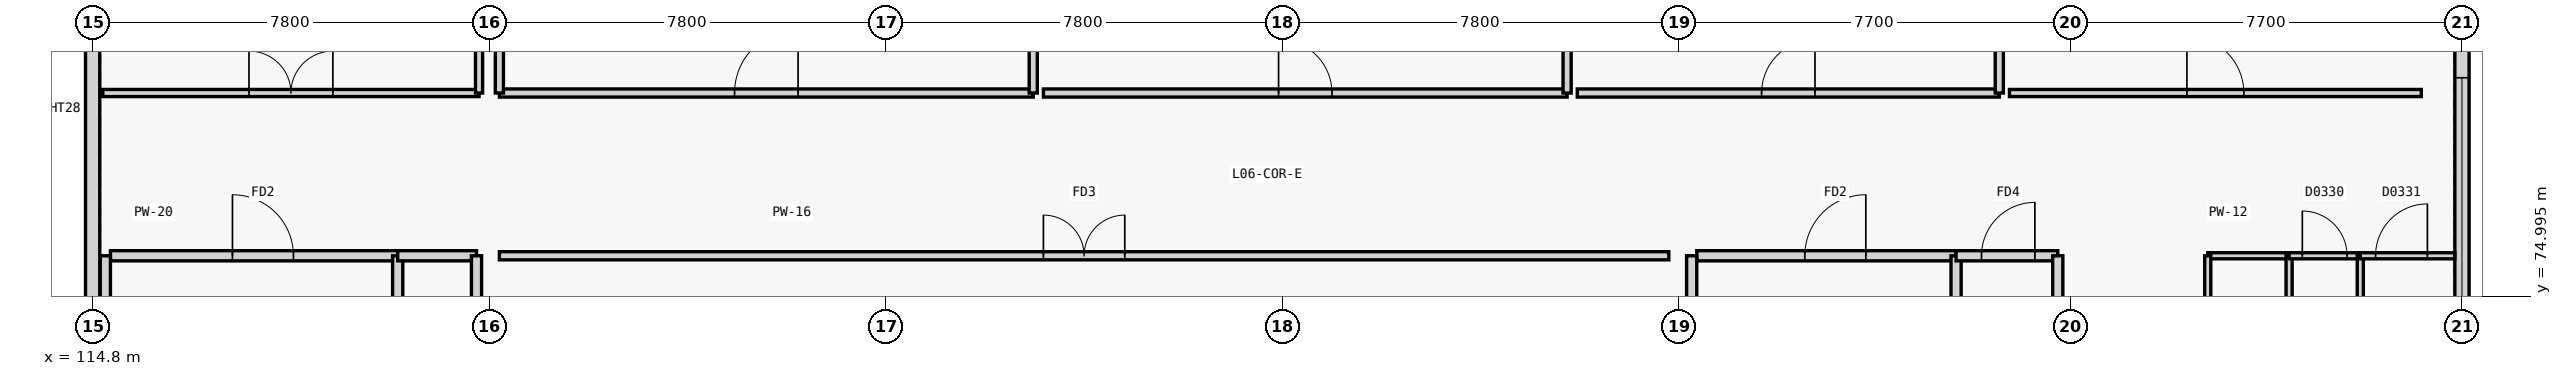
"""IFC4 building model, lengths in metres.
Left out: names, types, materials, properties, quantities, classifications, styles, units other than length and angle.
Written with IfcOpenShell. Run it as: python <this file> out.ifc"""

import sys

from ifc_helpers import new_model, si_unit, direction, frame, frame_2d, origin, place, context, subcontext, project, spatial, rectangle, extrude, element, fill, save


model = new_model("IFC4")
c1 = context("Model", 3, precision=1e-05, world=origin(), true_north=direction((0.0, 1.0)))
c2 = subcontext(c1, "Body", "Model", "MODEL_VIEW")
j1 = project(units=[si_unit("LENGTHUNIT", "METRE"), si_unit("PLANEANGLEUNIT", "RADIAN")], contexts=[c1])
p1 = place(None, origin())
s1 = spatial("IfcSite", under=j1, at=p1, CompositionType="ELEMENT")
p2 = place(p1, origin())
s2 = spatial("IfcBuilding", under=s1, at=p2, CompositionType="ELEMENT")
p3 = place(p2, frame((0.0, 0.0, 25.2)))
s3 = spatial("IfcBuildingStorey", under=s2, at=p3, CompositionType="ELEMENT", Elevation=25.2)
p4 = place(p3, frame((161.4, 96.777, 0.0), z_axis=(0.0, 0.0, 1.0), x_axis=(0.0, -1.0, 0.0)))
e1 = element("IfcWall", 1, at=p4, inside=s3, PredefinedType="SOLIDWALL", context=c2, shape_type="SweptSolid", body=[
    extrude(rectangle(XDim=32.554, YDim=0.28, at=frame_2d((16.277, 0.0))), origin(), (0.0, 0.0, 1.0), 2.78),
])
p5 = place(p4, frame((17.477, 0.0, 0.82)))
e2 = element("IfcOpeningElement", 2, at=p5, cuts=e1, PredefinedType="OPENING", context=c2, shape_type="SweptSolid", body=[
    extrude(rectangle(XDim=5.0, YDim=1.5, at=frame_2d((2.5, 0.75))), frame((0.0, 0.15, 0.0), z_axis=(0.0, -1.0, 0.0), x_axis=(1.0, 0.0, 0.0)), (0.0, 0.0, 1.0), 0.3),
])
p6 = place(p3, frame((114.8, 72.6, 0.0), z_axis=(0.0, 0.0, 1.0), x_axis=(0.0, 1.0, 0.0)))
e3 = element("IfcWall", 3, at=p6, inside=s3, PredefinedType="SOLIDWALL", context=c2, shape_type="SweptSolid", body=[
    extrude(rectangle(XDim=12.2, YDim=0.28, at=frame_2d((6.1, 0.0))), origin(), (0.0, 0.0, 1.0), 2.78),
])
p7 = place(p3, frame((115.15, 75.8, 0.0), z_axis=(0.0, 0.0, 1.0), x_axis=(1.0, 0.0, 0.0)))
e4 = element("IfcWall", 4, at=p7, inside=s3, PredefinedType="PARTITIONING", context=c2, shape_type="SweptSolid", body=[
    extrude(rectangle(XDim=5.65, YDim=0.2, at=frame_2d((2.825, 0.0))), origin(), (0.0, 0.0, 1.0), 3.32),
])
p8 = place(p7, frame((2.4, 0.0, 0.0)))
e5 = element("IfcOpeningElement", 5, at=p8, cuts=e4, PredefinedType="OPENING", context=c2, shape_type="SweptSolid", body=[
    extrude(rectangle(XDim=1.2, YDim=2.2, at=frame_2d((0.6, 1.1))), frame((0.0, 0.11, 0.0), z_axis=(0.0, -1.0, 0.0), x_axis=(1.0, 0.0, 0.0)), (0.0, 0.0, 1.0), 0.22),
])
p9 = place(p3, frame((115.05, 72.4, 0.0), z_axis=(0.0, 0.0, 1.0), x_axis=(0.0, 1.0, 0.0)))
e6 = element("IfcWall", 6, at=p9, inside=s3, PredefinedType="PARTITIONING", context=c2, shape_type="SweptSolid", body=[
    extrude(rectangle(XDim=3.4, YDim=0.2, at=frame_2d((1.7, 0.0))), origin(), (0.0, 0.0, 1.0), 2.78),
])
p10 = place(p3, frame((120.8, 72.4, 0.0), z_axis=(0.0, 0.0, 1.0), x_axis=(0.0, 1.0, 0.0)))
e7 = element("IfcWall", 7, at=p10, inside=s3, PredefinedType="PARTITIONING", context=c2, shape_type="SweptSolid", body=[
    extrude(rectangle(XDim=3.4, YDim=0.2, at=frame_2d((1.7, 0.0))), origin(), (0.0, 0.0, 1.0), 3.32),
])
p11 = place(p10, frame((1.1, 0.0, 0.0)))
e8 = element("IfcOpeningElement", 8, at=p11, cuts=e7, PredefinedType="OPENING", context=c2, shape_type="SweptSolid", body=[
    extrude(rectangle(XDim=1.2, YDim=2.2, at=frame_2d((0.6, 1.1))), frame((0.0, 0.11, 0.0), z_axis=(0.0, -1.0, 0.0), x_axis=(1.0, 0.0, 0.0)), (0.0, 0.0, 1.0), 0.22),
])
p12 = place(p3, frame((120.8, 75.8, 0.0), z_axis=(0.0, 0.0, 1.0), x_axis=(1.0, 0.0, 0.0)))
e9 = element("IfcWall", 9, at=p12, inside=s3, PredefinedType="PARTITIONING", context=c2, shape_type="SweptSolid", body=[
    extrude(rectangle(XDim=1.55, YDim=0.2, at=frame_2d((0.775, 0.0))), origin(), (0.0, 0.0, 1.0), 3.32),
])
p13 = place(p3, frame((122.35, 72.4, 0.0), z_axis=(0.0, 0.0, 1.0), x_axis=(0.0, 1.0, 0.0)))
e10 = element("IfcWall", 10, at=p13, inside=s3, PredefinedType="PARTITIONING", context=c2, shape_type="SweptSolid", body=[
    extrude(rectangle(XDim=3.4, YDim=0.2, at=frame_2d((1.7, 0.0))), origin(), (0.0, 0.0, 1.0), 2.82),
])
p14 = place(p3, frame((146.35, 75.8, 0.0), z_axis=(0.0, 0.0, 1.0), x_axis=(1.0, 0.0, 0.0)))
e11 = element("IfcWall", 11, at=p14, inside=s3, PredefinedType="PARTITIONING", context=c2, shape_type="SweptSolid", body=[
    extrude(rectangle(XDim=5.1, YDim=0.2, at=frame_2d((2.55, 0.0))), origin(), (0.0, 0.0, 1.0), 3.32),
])
p15 = place(p14, frame((2.125, 0.0, 0.0)))
e12 = element("IfcOpeningElement", 12, at=p15, cuts=e11, PredefinedType="OPENING", context=c2, shape_type="SweptSolid", body=[
    extrude(rectangle(XDim=1.2, YDim=2.2, at=frame_2d((0.6, 1.1))), frame((0.0, 0.11, 0.0), z_axis=(0.0, -1.0, 0.0), x_axis=(1.0, 0.0, 0.0)), (0.0, 0.0, 1.0), 0.22),
])
p16 = place(p3, frame((146.25, 72.4, 0.0), z_axis=(0.0, 0.0, 1.0), x_axis=(0.0, 1.0, 0.0)))
e13 = element("IfcWall", 13, at=p16, inside=s3, PredefinedType="PARTITIONING", context=c2, shape_type="SweptSolid", body=[
    extrude(rectangle(XDim=3.4, YDim=0.2, at=frame_2d((1.7, 0.0))), origin(), (0.0, 0.0, 1.0), 2.82),
])
p17 = place(p3, frame((151.45, 72.4, 0.0), z_axis=(0.0, 0.0, 1.0), x_axis=(0.0, 1.0, 0.0)))
e14 = element("IfcWall", 14, at=p17, inside=s3, PredefinedType="PARTITIONING", context=c2, shape_type="SweptSolid", body=[
    extrude(rectangle(XDim=3.4, YDim=0.2, at=frame_2d((1.7, 0.0))), origin(), (0.0, 0.0, 1.0), 3.32),
])
p18 = place(p17, frame((1.1, 0.0, 0.0)))
e15 = element("IfcOpeningElement", 15, at=p18, cuts=e14, PredefinedType="OPENING", context=c2, shape_type="SweptSolid", body=[
    extrude(rectangle(XDim=1.2, YDim=2.2, at=frame_2d((0.6, 1.1))), frame((0.0, 0.11, 0.0), z_axis=(0.0, -1.0, 0.0), x_axis=(1.0, 0.0, 0.0)), (0.0, 0.0, 1.0), 0.22),
])
p19 = place(p3, frame((151.45, 75.8, 0.0), z_axis=(0.0, 0.0, 1.0), x_axis=(1.0, 0.0, 0.0)))
e16 = element("IfcWall", 16, at=p19, inside=s3, PredefinedType="PARTITIONING", context=c2, shape_type="SweptSolid", body=[
    extrude(rectangle(XDim=2.0, YDim=0.2, at=frame_2d((1.0, 0.0))), origin(), (0.0, 0.0, 1.0), 3.32),
])
p20 = place(p19, frame((0.5, 0.0, 0.0)))
e17 = element("IfcOpeningElement", 17, at=p20, cuts=e16, PredefinedType="OPENING", context=c2, shape_type="SweptSolid", body=[
    extrude(rectangle(XDim=1.05, YDim=2.15, at=frame_2d((0.525, 1.075))), frame((0.0, 0.11, 0.0), z_axis=(0.0, -1.0, 0.0), x_axis=(1.0, 0.0, 0.0)), (0.0, 0.0, 1.0), 0.22),
])
p21 = place(p3, frame((153.45, 72.4, 0.0), z_axis=(0.0, 0.0, 1.0), x_axis=(0.0, 1.0, 0.0)))
e18 = element("IfcWall", 18, at=p21, inside=s3, PredefinedType="PARTITIONING", context=c2, shape_type="SweptSolid", body=[
    extrude(rectangle(XDim=3.4, YDim=0.2, at=frame_2d((1.7, 0.0))), origin(), (0.0, 0.0, 1.0), 2.82),
])
p22 = place(p3, frame((115.0, 79.0, 0.0), z_axis=(0.0, 0.0, 1.0), x_axis=(1.0, 0.0, 0.0)))
e19 = element("IfcWall", 19, at=p22, inside=s3, PredefinedType="PARTITIONING", context=c2, shape_type="SweptSolid", body=[
    extrude(rectangle(XDim=7.4, YDim=0.14, at=frame_2d((3.7, 0.0))), origin(), (0.0, 0.0, 1.0), 3.34),
])
p23 = place(p22, frame((2.875, 0.0, 0.0)))
e20 = element("IfcOpeningElement", 20, at=p23, cuts=e19, PredefinedType="OPENING", context=c2, shape_type="SweptSolid", body=[
    extrude(rectangle(XDim=1.65, YDim=2.3, at=frame_2d((0.825, 1.15))), frame((0.0, 0.08, 0.0), z_axis=(0.0, -1.0, 0.0), x_axis=(1.0, 0.0, 0.0)), (0.0, 0.0, 1.0), 0.16),
])
p24 = place(p3, frame((122.4, 79.0, 0.0), z_axis=(0.0, 0.0, 1.0), x_axis=(0.0, 1.0, 0.0)))
e21 = element("IfcWall", 21, at=p24, inside=s3, PredefinedType="PARTITIONING", context=c2, shape_type="SweptSolid", body=[
    extrude(rectangle(XDim=5.4, YDim=0.14, at=frame_2d((2.7, 0.0))), origin(), (0.0, 0.0, 1.0), 2.82),
])
p25 = place(p3, frame((122.8, 75.8, 0.0), z_axis=(0.0, 0.0, 1.0), x_axis=(1.0, 0.0, 0.0)))
e22 = element("IfcWall", 22, at=p25, inside=s3, PredefinedType="PARTITIONING", context=c2, shape_type="SweptSolid", body=[
    extrude(rectangle(XDim=23.0, YDim=0.16, at=frame_2d((11.5, 0.0))), origin(), (0.0, 0.0, 1.0), 3.34),
])
p26 = place(p25, frame((10.7, 0.0, 0.0)))
e23 = element("IfcOpeningElement", 23, at=p26, cuts=e22, PredefinedType="OPENING", context=c2, shape_type="SweptSolid", body=[
    extrude(rectangle(XDim=1.6, YDim=2.2, at=frame_2d((0.8, 1.1))), frame((0.0, 0.09, 0.0), z_axis=(0.0, -1.0, 0.0), x_axis=(1.0, 0.0, 0.0)), (0.0, 0.0, 1.0), 0.18),
])
p27 = place(p3, frame((156.4, 75.8, 0.0), z_axis=(0.0, 0.0, 1.0), x_axis=(1.0, 0.0, 0.0)))
e24 = element("IfcWall", 24, at=p27, inside=s3, PredefinedType="PARTITIONING", context=c2, shape_type="SweptSolid", body=[
    extrude(rectangle(XDim=1.6, YDim=0.12, at=frame_2d((0.8, 0.0))), origin(), (0.0, 0.0, 1.0), 3.34),
])
p28 = place(p3, frame((156.4, 70.6, 0.0), z_axis=(0.0, 0.0, 1.0), x_axis=(0.0, 1.0, 0.0)))
e25 = element("IfcWall", 25, at=p28, inside=s3, PredefinedType="PARTITIONING", context=c2, shape_type="SweptSolid", body=[
    extrude(rectangle(XDim=5.2, YDim=0.12, at=frame_2d((2.6, 0.0))), origin(), (0.0, 0.0, 1.0), 3.34),
])
p29 = place(p28, frame((2.16, 0.0, 0.0)))
e26 = element("IfcOpeningElement", 26, at=p29, cuts=e25, PredefinedType="OPENING", context=c2, shape_type="SweptSolid", body=[
    extrude(rectangle(XDim=0.88, YDim=2.1, at=frame_2d((0.44, 1.05))), frame((0.0, 0.07, 0.0), z_axis=(0.0, -1.0, 0.0), x_axis=(1.0, 0.0, 0.0)), (0.0, 0.0, 1.0), 0.14),
])
p30 = place(p3, frame((158.0, 70.6, 0.0), z_axis=(0.0, 0.0, 1.0), x_axis=(0.0, 1.0, 0.0)))
e27 = element("IfcWall", 27, at=p30, inside=s3, PredefinedType="PARTITIONING", context=c2, shape_type="SweptSolid", body=[
    extrude(rectangle(XDim=5.2, YDim=0.12, at=frame_2d((2.6, 0.0))), origin(), (0.0, 0.0, 1.0), 3.34),
])
p31 = place(p3, frame((158.0, 75.8, 0.0), z_axis=(0.0, 0.0, 1.0), x_axis=(1.0, 0.0, 0.0)))
e28 = element("IfcWall", 28, at=p31, inside=s3, PredefinedType="PARTITIONING", context=c2, shape_type="SweptSolid", body=[
    extrude(rectangle(XDim=1.4, YDim=0.12, at=frame_2d((0.7, 0.0))), origin(), (0.0, 0.0, 1.0), 3.34),
])
p32 = place(p31, frame((0.26, 0.0, 0.0)))
e29 = element("IfcOpeningElement", 29, at=p32, cuts=e28, PredefinedType="OPENING", context=c2, shape_type="SweptSolid", body=[
    extrude(rectangle(XDim=0.88, YDim=2.1, at=frame_2d((0.44, 1.05))), frame((0.0, 0.07, 0.0), z_axis=(0.0, -1.0, 0.0), x_axis=(1.0, 0.0, 0.0)), (0.0, 0.0, 1.0), 0.14),
])
p33 = place(p3, frame((159.4, 70.6, 0.0), z_axis=(0.0, 0.0, 1.0), x_axis=(0.0, 1.0, 0.0)))
e30 = element("IfcWall", 30, at=p33, inside=s3, PredefinedType="PARTITIONING", context=c2, shape_type="SweptSolid", body=[
    extrude(rectangle(XDim=5.2, YDim=0.12, at=frame_2d((2.6, 0.0))), origin(), (0.0, 0.0, 1.0), 3.34),
])
p34 = place(p3, frame((159.4, 75.8, 0.0), z_axis=(0.0, 0.0, 1.0), x_axis=(1.0, 0.0, 0.0)))
e31 = element("IfcWall", 31, at=p34, inside=s3, PredefinedType="PARTITIONING", context=c2, shape_type="SweptSolid", body=[
    extrude(rectangle(XDim=1.86, YDim=0.12, at=frame_2d((0.93, 0.0))), origin(), (0.0, 0.0, 1.0), 3.34),
])
p35 = place(p34, frame((0.3, 0.0, 0.0)))
e32 = element("IfcOpeningElement", 32, at=p35, cuts=e31, PredefinedType="OPENING", context=c2, shape_type="SweptSolid", body=[
    extrude(rectangle(XDim=1.02, YDim=2.1, at=frame_2d((0.51, 1.05))), frame((0.0, 0.07, 0.0), z_axis=(0.0, -1.0, 0.0), x_axis=(1.0, 0.0, 0.0)), (0.0, 0.0, 1.0), 0.14),
])
p36 = place(p3, frame((122.8, 79.0, 0.0), z_axis=(0.0, 0.0, 1.0), x_axis=(1.0, 0.0, 0.0)))
e33 = element("IfcWall", 33, at=p36, inside=s3, PredefinedType="PARTITIONING", context=c2, shape_type="SweptSolid", body=[
    extrude(rectangle(XDim=10.5, YDim=0.16, at=frame_2d((5.25, 0.0))), origin(), (0.0, 0.0, 1.0), 3.34),
])
p37 = place(p36, frame((4.625, 0.0, 0.0)))
e34 = element("IfcOpeningElement", 34, at=p37, cuts=e33, PredefinedType="OPENING", context=c2, shape_type="SweptSolid", body=[
    extrude(rectangle(XDim=1.25, YDim=2.2, at=frame_2d((0.625, 1.1))), frame((0.0, 0.09, 0.0), z_axis=(0.0, -1.0, 0.0), x_axis=(1.0, 0.0, 0.0)), (0.0, 0.0, 1.0), 0.18),
])
p38 = place(p3, frame((122.8, 79.0, 0.0), z_axis=(0.0, 0.0, 1.0), x_axis=(0.0, 1.0, 0.0)))
e35 = element("IfcWall", 35, at=p38, inside=s3, PredefinedType="PARTITIONING", context=c2, shape_type="SweptSolid", body=[
    extrude(rectangle(XDim=17.6, YDim=0.16, at=frame_2d((8.8, 0.0))), origin(), (0.0, 0.0, 1.0), 2.82),
])
p39 = place(p3, frame((133.3, 79.0, 0.0), z_axis=(0.0, 0.0, 1.0), x_axis=(0.0, 1.0, 0.0)))
e36 = element("IfcWall", 36, at=p39, inside=s3, PredefinedType="PARTITIONING", context=c2, shape_type="SweptSolid", body=[
    extrude(rectangle(XDim=17.6, YDim=0.16, at=frame_2d((8.8, 0.0))), origin(), (0.0, 0.0, 1.0), 3.34),
])
p40 = place(p3, frame((133.5, 79.0, 0.0), z_axis=(0.0, 0.0, 1.0), x_axis=(1.0, 0.0, 0.0)))
e37 = element("IfcWall", 37, at=p40, inside=s3, PredefinedType="PARTITIONING", context=c2, shape_type="SweptSolid", body=[
    extrude(rectangle(XDim=10.3, YDim=0.16, at=frame_2d((5.15, 0.0))), origin(), (0.0, 0.0, 1.0), 3.34),
])
p41 = place(p40, frame((4.625, 0.0, 0.0)))
e38 = element("IfcOpeningElement", 38, at=p41, cuts=e37, PredefinedType="OPENING", context=c2, shape_type="SweptSolid", body=[
    extrude(rectangle(XDim=1.05, YDim=2.15, at=frame_2d((0.525, 1.075))), frame((0.0, 0.09, 0.0), z_axis=(0.0, -1.0, 0.0), x_axis=(1.0, 0.0, 0.0)), (0.0, 0.0, 1.0), 0.18),
])
p42 = place(p3, frame((143.8, 79.0, 0.0), z_axis=(0.0, 0.0, 1.0), x_axis=(0.0, 1.0, 0.0)))
e39 = element("IfcWall", 39, at=p42, inside=s3, PredefinedType="PARTITIONING", context=c2, shape_type="SweptSolid", body=[
    extrude(rectangle(XDim=17.6, YDim=0.16, at=frame_2d((8.8, 0.0))), origin(), (0.0, 0.0, 1.0), 3.34),
])
p43 = place(p3, frame((144.0, 79.0, 0.0), z_axis=(0.0, 0.0, 1.0), x_axis=(1.0, 0.0, 0.0)))
e40 = element("IfcWall", 40, at=p43, inside=s3, PredefinedType="PARTITIONING", context=c2, shape_type="SweptSolid", body=[
    extrude(rectangle(XDim=8.3, YDim=0.16, at=frame_2d((4.15, 0.0))), origin(), (0.0, 0.0, 1.0), 3.34),
])
p44 = place(p43, frame((3.625, 0.0, 0.0)))
e41 = element("IfcOpeningElement", 41, at=p44, cuts=e40, PredefinedType="OPENING", context=c2, shape_type="SweptSolid", body=[
    extrude(rectangle(XDim=1.05, YDim=2.15, at=frame_2d((0.525, 1.075))), frame((0.0, 0.09, 0.0), z_axis=(0.0, -1.0, 0.0), x_axis=(1.0, 0.0, 0.0)), (0.0, 0.0, 1.0), 0.18),
])
p45 = place(p3, frame((152.3, 79.0, 0.0), z_axis=(0.0, 0.0, 1.0), x_axis=(0.0, 1.0, 0.0)))
e42 = element("IfcWall", 42, at=p45, inside=s3, PredefinedType="PARTITIONING", context=c2, shape_type="SweptSolid", body=[
    extrude(rectangle(XDim=17.6, YDim=0.16, at=frame_2d((8.8, 0.0))), origin(), (0.0, 0.0, 1.0), 3.34),
])
p46 = place(p3, frame((152.5, 79.0, 0.0), z_axis=(0.0, 0.0, 1.0), x_axis=(1.0, 0.0, 0.0)))
e43 = element("IfcWall", 43, at=p46, inside=s3, PredefinedType="PARTITIONING", context=c2, shape_type="SweptSolid", body=[
    extrude(rectangle(XDim=8.1, YDim=0.14, at=frame_2d((4.05, 0.0))), origin(), (0.0, 0.0, 1.0), 3.34),
])
p47 = place(p46, frame((3.49, 0.0, 0.0)))
e44 = element("IfcOpeningElement", 44, at=p47, cuts=e43, PredefinedType="OPENING", context=c2, shape_type="SweptSolid", body=[
    extrude(rectangle(XDim=1.12, YDim=2.15, at=frame_2d((0.56, 1.075))), frame((0.0, 0.08, 0.0), z_axis=(0.0, -1.0, 0.0), x_axis=(1.0, 0.0, 0.0)), (0.0, 0.0, 1.0), 0.16),
])
p48 = place(p5, origin())
e45 = element("IfcWindow", 45, at=p48, inside=s3, PartitioningType="SINGLE_PANEL", PredefinedType="WINDOW", context=c2, shape_type="SweptSolid", body=[
    extrude(rectangle(XDim=5.0, YDim=1.5, at=frame_2d((2.5, 0.75))), frame((0.0, 0.03, 0.0), z_axis=(0.0, -1.0, 0.0), x_axis=(1.0, 0.0, 0.0)), (0.0, 0.0, 1.0), 0.06),
])
fill(e2, e45)
p49 = place(p8, origin())
e46 = element("IfcDoor", 46, at=p49, inside=s3, OperationType="SINGLE_SWING_LEFT", PredefinedType="DOOR", context=c2, shape_type="SweptSolid", body=[
    extrude(rectangle(XDim=1.2, YDim=2.2, at=frame_2d((0.6, 1.1))), frame((0.0, 0.025, 0.0), z_axis=(0.0, -1.0, 0.0), x_axis=(1.0, 0.0, 0.0)), (0.0, 0.0, 1.0), 0.05),
])
fill(e5, e46)
p50 = place(p15, origin())
e47 = element("IfcDoor", 47, at=p50, inside=s3, OperationType="SINGLE_SWING_RIGHT", PredefinedType="DOOR", context=c2, shape_type="SweptSolid", body=[
    extrude(rectangle(XDim=1.2, YDim=2.2, at=frame_2d((0.6, 1.1))), frame((0.0, 0.025, 0.0), z_axis=(0.0, -1.0, 0.0), x_axis=(1.0, 0.0, 0.0)), (0.0, 0.0, 1.0), 0.05),
])
fill(e12, e47)
p51 = place(p20, origin())
e48 = element("IfcDoor", 48, at=p51, inside=s3, OperationType="SINGLE_SWING_RIGHT", PredefinedType="DOOR", context=c2, shape_type="SweptSolid", body=[
    extrude(rectangle(XDim=1.05, YDim=2.15, at=frame_2d((0.525, 1.075))), frame((0.0, 0.025, 0.0), z_axis=(0.0, -1.0, 0.0), x_axis=(1.0, 0.0, 0.0)), (0.0, 0.0, 1.0), 0.05),
])
fill(e17, e48)
p52 = place(p23, origin())
e49 = element("IfcDoor", 49, at=p52, inside=s3, OperationType="DOUBLE_DOOR_SINGLE_SWING", PredefinedType="DOOR", context=c2, shape_type="SweptSolid", body=[
    extrude(rectangle(XDim=1.65, YDim=2.3, at=frame_2d((0.825, 1.15))), frame((0.0, 0.025, 0.0), z_axis=(0.0, -1.0, 0.0), x_axis=(1.0, 0.0, 0.0)), (0.0, 0.0, 1.0), 0.05),
])
fill(e20, e49)
p53 = place(p26, origin())
e50 = element("IfcDoor", 50, at=p53, inside=s3, OperationType="DOUBLE_DOOR_SINGLE_SWING", PredefinedType="DOOR", context=c2, shape_type="SweptSolid", body=[
    extrude(rectangle(XDim=1.6, YDim=2.2, at=frame_2d((0.8, 1.1))), frame((0.0, 0.025, 0.0), z_axis=(0.0, -1.0, 0.0), x_axis=(1.0, 0.0, 0.0)), (0.0, 0.0, 1.0), 0.05),
])
fill(e23, e50)
p54 = place(p32, origin())
e51 = element("IfcDoor", 51, at=p54, inside=s3, OperationType="SINGLE_SWING_LEFT", PredefinedType="DOOR", context=c2, shape_type="SweptSolid", body=[
    extrude(rectangle(XDim=0.88, YDim=2.1, at=frame_2d((0.44, 1.05))), frame((0.0, 0.025, 0.0), z_axis=(0.0, -1.0, 0.0), x_axis=(1.0, 0.0, 0.0)), (0.0, 0.0, 1.0), 0.05),
])
fill(e29, e51)
p55 = place(p35, origin())
e52 = element("IfcDoor", 52, at=p55, inside=s3, OperationType="SINGLE_SWING_RIGHT", PredefinedType="DOOR", context=c2, shape_type="SweptSolid", body=[
    extrude(rectangle(XDim=1.02, YDim=2.1, at=frame_2d((0.51, 1.05))), frame((0.0, 0.025, 0.0), z_axis=(0.0, -1.0, 0.0), x_axis=(1.0, 0.0, 0.0)), (0.0, 0.0, 1.0), 0.05),
])
fill(e32, e52)
p56 = place(p37, origin())
e53 = element("IfcDoor", 53, at=p56, inside=s3, OperationType="SINGLE_SWING_RIGHT", PredefinedType="DOOR", context=c2, shape_type="SweptSolid", body=[
    extrude(rectangle(XDim=1.25, YDim=2.2, at=frame_2d((0.625, 1.1))), frame((0.0, 0.025, 0.0), z_axis=(0.0, -1.0, 0.0), x_axis=(1.0, 0.0, 0.0)), (0.0, 0.0, 1.0), 0.05),
])
fill(e34, e53)
p57 = place(p41, origin())
e54 = element("IfcDoor", 54, at=p57, inside=s3, OperationType="SINGLE_SWING_LEFT", PredefinedType="DOOR", context=c2, shape_type="SweptSolid", body=[
    extrude(rectangle(XDim=1.05, YDim=2.15, at=frame_2d((0.525, 1.075))), frame((0.0, 0.025, 0.0), z_axis=(0.0, -1.0, 0.0), x_axis=(1.0, 0.0, 0.0)), (0.0, 0.0, 1.0), 0.05),
])
fill(e38, e54)
p58 = place(p44, origin())
e55 = element("IfcDoor", 55, at=p58, inside=s3, OperationType="SINGLE_SWING_RIGHT", PredefinedType="DOOR", context=c2, shape_type="SweptSolid", body=[
    extrude(rectangle(XDim=1.05, YDim=2.15, at=frame_2d((0.525, 1.075))), frame((0.0, 0.025, 0.0), z_axis=(0.0, -1.0, 0.0), x_axis=(1.0, 0.0, 0.0)), (0.0, 0.0, 1.0), 0.05),
])
fill(e41, e55)
p59 = place(p47, origin())
e56 = element("IfcDoor", 56, at=p59, inside=s3, OperationType="SINGLE_SWING_LEFT", PredefinedType="DOOR", context=c2, shape_type="SweptSolid", body=[
    extrude(rectangle(XDim=1.12, YDim=2.15, at=frame_2d((0.56, 1.075))), frame((0.0, 0.025, 0.0), z_axis=(0.0, -1.0, 0.0), x_axis=(1.0, 0.0, 0.0)), (0.0, 0.0, 1.0), 0.05),
])
fill(e44, e56)
save(model, sys.argv[1])
